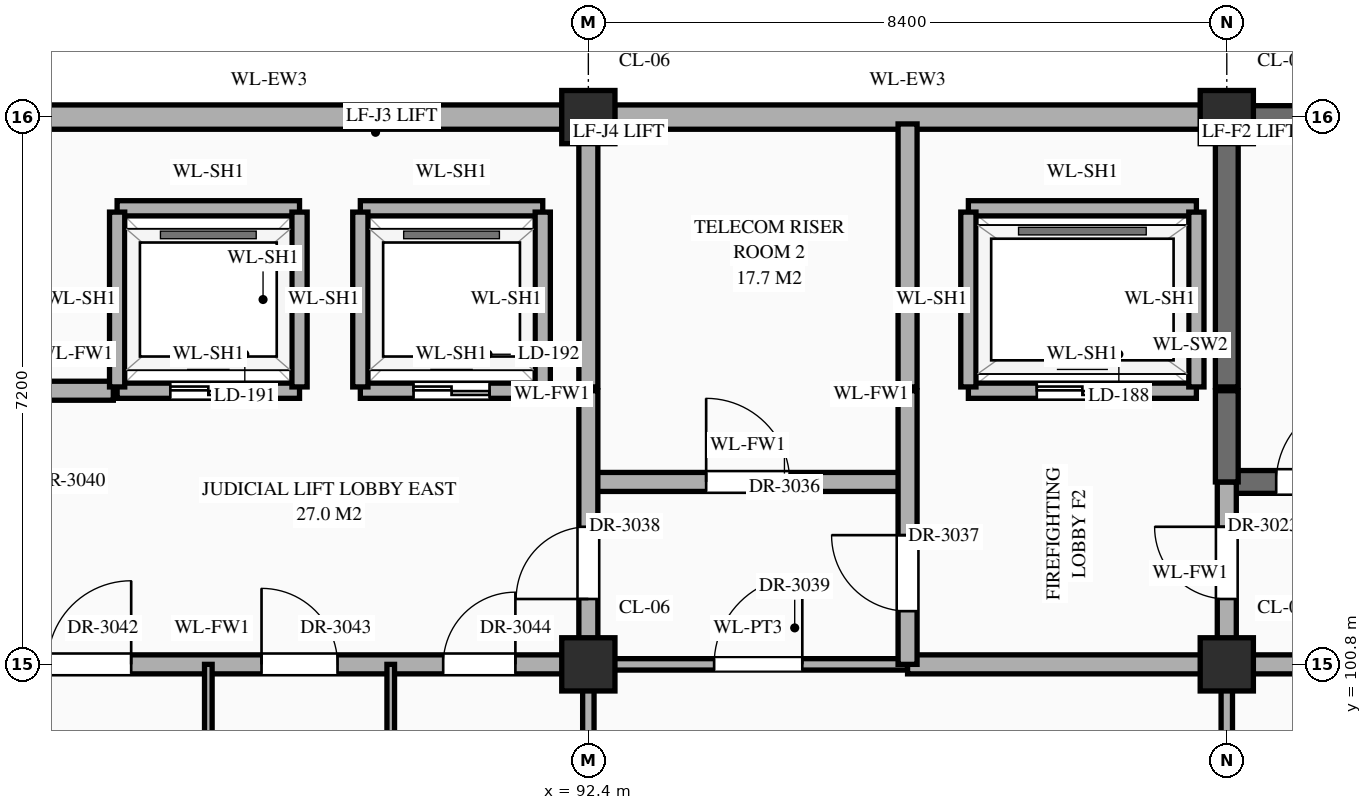
"""IFC4 building model, lengths in metres.
Left out: names, types, materials, properties, quantities, classifications, styles, units other than length and angle.
Written with IfcOpenShell. Run it as: python <this file> out.ifc"""

import sys

from ifc_helpers import new_model, si_unit, direction, frame, frame_2d, origin, origin_2d, place, context, subcontext, project, spatial, rectangle, extrude, element, fill, save


model = new_model("IFC4")
c1 = context("Model", 3, precision=1e-05, world=origin(), true_north=direction((0.0, 1.0)))
c2 = subcontext(c1, "Body", "Model", "MODEL_VIEW")
j1 = project(units=[si_unit("LENGTHUNIT", "METRE"), si_unit("PLANEANGLEUNIT", "RADIAN")], contexts=[c1])
p1 = place(None, origin())
s1 = spatial("IfcSite", under=j1, at=p1, CompositionType="ELEMENT")
p2 = place(p1, origin())
s2 = spatial("IfcBuilding", under=s1, at=p2, CompositionType="ELEMENT")
p3 = place(p2, frame((0.0, 0.0, 51.9)))
s3 = spatial("IfcBuildingStorey", under=s2, at=p3, CompositionType="ELEMENT", Elevation=51.9)
for number, where, z_axis, x_axis in (
    (1, (92.4, 100.8, 0.0), (0.0, 0.0, 1.0), (1.0, 0.0, 0.0)),
    (2, (92.4, 108.0, 0.0), (0.0, 0.0, 1.0), (1.0, 0.0, 0.0)),
    (3, (100.8, 100.8, 0.0), (0.0, 0.0, 1.0), (1.0, 0.0, 0.0)),
    (4, (100.8, 108.0, 0.0), (0.0, 0.0, 1.0), (1.0, 0.0, 0.0)),
):
    element("IfcColumn", number, at=place(p3, frame(where, z_axis=z_axis, x_axis=x_axis)), inside=s3, PredefinedType="COLUMN", context=c2, shape_type="SweptSolid", body=[
        extrude(rectangle(XDim=0.7, YDim=0.7, at=origin_2d()), origin(), (0.0, 0.0, 1.0), 4.2),
    ])
for number, where, z_axis, x_axis in (
    (5, (84.345, 108.0, 0.0), (0.0, 0.0, 1.0), (1.0, 0.0, 0.0)),
    (6, (92.745, 108.0, 0.0), (0.0, 0.0, 1.0), (1.0, 0.0, 0.0)),
):
    element("IfcWall", number, at=place(p3, frame(where, z_axis=z_axis, x_axis=x_axis)), inside=s3, PredefinedType="STANDARD", context=c2, shape_type="SweptSolid", body=[
        extrude(rectangle(XDim=7.71, YDim=0.32, at=frame_2d((3.855, 0.0))), origin(), (0.0, 0.0, 1.0), 3.31),
    ])
p4 = place(p3, frame((101.145, 108.0, 0.0), z_axis=(0.0, 0.0, 1.0), x_axis=(1.0, 0.0, 0.0)))
e7 = element("IfcWall", 7, at=p4, inside=s3, PredefinedType="SHEAR", context=c2, shape_type="SweptSolid", body=[
    extrude(rectangle(XDim=7.71, YDim=0.3, at=frame_2d((3.855, 0.0))), origin(), (0.0, 0.0, 1.0), 3.96),
])
p5 = place(p3, frame((75.6, 100.8, 0.0), z_axis=(0.0, 0.0, 1.0), x_axis=(1.0, 0.0, 0.0)))
e8 = element("IfcWall", 8, at=p5, inside=s3, PredefinedType="STANDARD", context=c2, shape_type="SweptSolid", body=[
    extrude(rectangle(XDim=16.8, YDim=0.25, at=frame_2d((8.4, 0.0))), origin(), (0.0, 0.0, 1.0), 3.11),
])
p6 = place(p5, frame((3.725, 0.0, 0.0)))
e9 = element("IfcOpeningElement", 9, at=p6, cuts=e8, PredefinedType="OPENING", context=c2, shape_type="SweptSolid", body=[
    extrude(rectangle(XDim=0.95, YDim=2.15, at=frame_2d((0.475, 1.075))), frame((0.0, 0.137, 0.0), z_axis=(0.0, -1.0, 0.0), x_axis=(1.0, 0.0, 0.0)), (0.0, 0.0, 1.0), 0.274),
])
p7 = place(p5, frame((9.685, 0.0, 0.0)))
e10 = element("IfcOpeningElement", 10, at=p7, cuts=e8, PredefinedType="OPENING", context=c2, shape_type="SweptSolid", body=[
    extrude(rectangle(XDim=1.1, YDim=2.2, at=frame_2d((0.55, 1.1))), frame((0.0, 0.137, 0.0), z_axis=(0.0, -1.0, 0.0), x_axis=(1.0, 0.0, 0.0)), (0.0, 0.0, 1.0), 0.274),
])
p8 = place(p5, frame((12.5, 0.0, 0.0)))
e11 = element("IfcOpeningElement", 11, at=p8, cuts=e8, PredefinedType="OPENING", context=c2, shape_type="SweptSolid", body=[
    extrude(rectangle(XDim=1.0, YDim=2.2, at=frame_2d((0.5, 1.1))), frame((0.0, 0.137, 0.0), z_axis=(0.0, -1.0, 0.0), x_axis=(1.0, 0.0, 0.0)), (0.0, 0.0, 1.0), 0.274),
])
p9 = place(p5, frame((14.89, 0.0, 0.0)))
e12 = element("IfcOpeningElement", 12, at=p9, cuts=e8, PredefinedType="OPENING", context=c2, shape_type="SweptSolid", body=[
    extrude(rectangle(XDim=0.95, YDim=2.15, at=frame_2d((0.475, 1.075))), frame((0.0, 0.137, 0.0), z_axis=(0.0, -1.0, 0.0), x_axis=(1.0, 0.0, 0.0)), (0.0, 0.0, 1.0), 0.274),
])
p10 = place(p3, frame((92.4, 100.8, 0.0), z_axis=(0.0, 0.0, 1.0), x_axis=(1.0, 0.0, 0.0)))
e13 = element("IfcWall", 13, at=p10, inside=s3, PredefinedType="STANDARD", context=c2, shape_type="SweptSolid", body=[
    extrude(rectangle(XDim=4.2, YDim=0.15, at=frame_2d((2.1, 0.0))), origin(), (0.0, 0.0, 1.0), 3.11),
])
p11 = place(p10, frame((1.655, 0.0, 0.0)))
e14 = element("IfcOpeningElement", 14, at=p11, cuts=e13, PredefinedType="OPENING", context=c2, shape_type="SweptSolid", body=[
    extrude(rectangle(XDim=1.16, YDim=2.3, at=frame_2d((0.58, 1.15))), frame((0.0, 0.087, 0.0), z_axis=(0.0, -1.0, 0.0), x_axis=(1.0, 0.0, 0.0)), (0.0, 0.0, 1.0), 0.174),
])
p12 = place(p3, frame((96.6, 100.8, 0.0), z_axis=(0.0, 0.0, 1.0), x_axis=(1.0, 0.0, 0.0)))
e15 = element("IfcWall", 15, at=p12, inside=s3, PredefinedType="STANDARD", context=c2, shape_type="SweptSolid", body=[
    extrude(rectangle(XDim=12.6, YDim=0.25, at=frame_2d((6.3, 0.0))), origin(), (0.0, 0.0, 1.0), 3.11),
])
p13 = place(p12, frame((7.9, 0.0, 0.0)))
e16 = element("IfcOpeningElement", 16, at=p13, cuts=e15, PredefinedType="OPENING", context=c2, shape_type="SweptSolid", body=[
    extrude(rectangle(XDim=1.0, YDim=2.2, at=frame_2d((0.5, 1.1))), frame((0.0, 0.137, 0.0), z_axis=(0.0, -1.0, 0.0), x_axis=(1.0, 0.0, 0.0)), (0.0, 0.0, 1.0), 0.274),
])
p14 = place(p3, frame((92.4, 103.2, 0.0), z_axis=(0.0, 0.0, 1.0), x_axis=(1.0, 0.0, 0.0)))
e17 = element("IfcWall", 17, at=p14, inside=s3, PredefinedType="STANDARD", context=c2, shape_type="SweptSolid", body=[
    extrude(rectangle(XDim=4.2, YDim=0.25, at=frame_2d((2.1, 0.0))), origin(), (0.0, 0.0, 1.0), 3.96),
])
p15 = place(p14, frame((1.55, 0.0, 0.0)))
e18 = element("IfcOpeningElement", 18, at=p15, cuts=e17, PredefinedType="OPENING", context=c2, shape_type="SweptSolid", body=[
    extrude(rectangle(XDim=1.1, YDim=2.2, at=frame_2d((0.55, 1.1))), frame((0.0, 0.137, 0.0), z_axis=(0.0, -1.0, 0.0), x_axis=(1.0, 0.0, 0.0)), (0.0, 0.0, 1.0), 0.274),
])
p16 = place(p3, frame((100.8, 103.2, 0.0), z_axis=(0.0, 0.0, 1.0), x_axis=(1.0, 0.0, 0.0)))
e19 = element("IfcWall", 19, at=p16, inside=s3, PredefinedType="SHEAR", context=c2, shape_type="SweptSolid", body=[
    extrude(rectangle(XDim=8.4, YDim=0.3, at=frame_2d((4.2, 0.0))), origin(), (0.0, 0.0, 1.0), 3.96),
])
p17 = place(p16, frame((0.65, 0.0, 0.0)))
e20 = element("IfcOpeningElement", 20, at=p17, cuts=e19, PredefinedType="OPENING", context=c2, shape_type="SweptSolid", body=[
    extrude(rectangle(XDim=1.1, YDim=2.2, at=frame_2d((0.55, 1.1))), frame((0.0, 0.162, 0.0), z_axis=(0.0, -1.0, 0.0), x_axis=(1.0, 0.0, 0.0)), (0.0, 0.0, 1.0), 0.324),
])
p18 = place(p3, frame((84.05, 104.4, 0.0), z_axis=(0.0, 0.0, 1.0), x_axis=(1.0, 0.0, 0.0)))
e21 = element("IfcWall", 21, at=p18, inside=s3, PredefinedType="STANDARD", context=c2, shape_type="SweptSolid", body=[
    extrude(rectangle(XDim=2.1, YDim=0.25, at=frame_2d((1.05, 0.0))), origin(), (0.0, 0.0, 1.0), 3.96),
])
p19 = place(p3, frame((86.2, 104.4, 0.0), z_axis=(0.0, 0.0, 1.0), x_axis=(1.0, 0.0, 0.0)))
e22 = element("IfcWall", 22, at=p19, inside=s3, PredefinedType="STANDARD", context=c2, shape_type="SweptSolid", body=[
    extrude(rectangle(XDim=2.4, YDim=0.2, at=frame_2d((1.2, 0.0))), origin(), (0.0, 0.0, 1.0), 3.96),
])
p20 = place(p19, frame((0.7, 0.0, 0.0)))
e23 = element("IfcOpeningElement", 23, at=p20, cuts=e22, PredefinedType="OPENING", context=c2, shape_type="SweptSolid", body=[
    extrude(rectangle(XDim=1.0, YDim=2.15, at=frame_2d((0.5, 1.075))), frame((0.0, 0.112, 0.0), z_axis=(0.0, -1.0, 0.0), x_axis=(1.0, 0.0, 0.0)), (0.0, 0.0, 1.0), 0.224),
])
p21 = place(p3, frame((89.4, 104.4, 0.0), z_axis=(0.0, 0.0, 1.0), x_axis=(1.0, 0.0, 0.0)))
e24 = element("IfcWall", 24, at=p21, inside=s3, PredefinedType="STANDARD", context=c2, shape_type="SweptSolid", body=[
    extrude(rectangle(XDim=2.4, YDim=0.2, at=frame_2d((1.2, 0.0))), origin(), (0.0, 0.0, 1.0), 3.96),
])
p22 = place(p21, frame((0.7, 0.0, 0.0)))
e25 = element("IfcOpeningElement", 25, at=p22, cuts=e24, PredefinedType="OPENING", context=c2, shape_type="SweptSolid", body=[
    extrude(rectangle(XDim=1.0, YDim=2.15, at=frame_2d((0.5, 1.075))), frame((0.0, 0.112, 0.0), z_axis=(0.0, -1.0, 0.0), x_axis=(1.0, 0.0, 0.0)), (0.0, 0.0, 1.0), 0.224),
])
p23 = place(p3, frame((97.4, 104.4, 0.0), z_axis=(0.0, 0.0, 1.0), x_axis=(1.0, 0.0, 0.0)))
e26 = element("IfcWall", 26, at=p23, inside=s3, PredefinedType="STANDARD", context=c2, shape_type="SweptSolid", body=[
    extrude(rectangle(XDim=3.0, YDim=0.2, at=frame_2d((1.5, 0.0))), origin(), (0.0, 0.0, 1.0), 3.96),
])
p24 = place(p23, frame((0.9, 0.0, 0.0)))
e27 = element("IfcOpeningElement", 27, at=p24, cuts=e26, PredefinedType="OPENING", context=c2, shape_type="SweptSolid", body=[
    extrude(rectangle(XDim=1.2, YDim=2.15, at=frame_2d((0.6, 1.075))), frame((0.0, 0.112, 0.0), z_axis=(0.0, -1.0, 0.0), x_axis=(1.0, 0.0, 0.0)), (0.0, 0.0, 1.0), 0.224),
])
for number, where, z_axis, x_axis in (
    (28, (86.2, 106.8, 0.0), (0.0, 0.0, 1.0), (1.0, 0.0, 0.0)),
    (29, (89.4, 106.8, 0.0), (0.0, 0.0, 1.0), (1.0, 0.0, 0.0)),
):
    element("IfcWall", number, at=place(p3, frame(where, z_axis=z_axis, x_axis=x_axis)), inside=s3, PredefinedType="STANDARD", context=c2, shape_type="SweptSolid", body=[
        extrude(rectangle(XDim=2.4, YDim=0.2, at=frame_2d((1.2, 0.0))), origin(), (0.0, 0.0, 1.0), 3.96),
    ])
p25 = place(p3, frame((97.4, 106.8, 0.0), z_axis=(0.0, 0.0, 1.0), x_axis=(1.0, 0.0, 0.0)))
e30 = element("IfcWall", 30, at=p25, inside=s3, PredefinedType="STANDARD", context=c2, shape_type="SweptSolid", body=[
    extrude(rectangle(XDim=3.0, YDim=0.2, at=frame_2d((1.5, 0.0))), origin(), (0.0, 0.0, 1.0), 3.96),
])
p26 = place(p3, frame((86.2, 104.45, 0.0), z_axis=(0.0, 0.0, 1.0), x_axis=(0.0, 1.0, 0.0)))
e31 = element("IfcWall", 31, at=p26, inside=s3, PredefinedType="STANDARD", context=c2, shape_type="SweptSolid", body=[
    extrude(rectangle(XDim=2.3, YDim=0.2, at=frame_2d((1.15, 0.0))), origin(), (0.0, 0.0, 1.0), 3.96),
])
p27 = place(p3, frame((87.4, 96.0, 0.0), z_axis=(0.0, 0.0, 1.0), x_axis=(0.0, 1.0, 0.0)))
e32 = element("IfcWall", 32, at=p27, inside=s3, PredefinedType="STANDARD", context=c2, shape_type="SweptSolid", body=[
    extrude(rectangle(XDim=4.8, YDim=0.1, at=frame_2d((2.4, 0.0))), origin(), (0.0, 0.0, 1.0), 3.96),
])
p28 = place(p27, frame((1.88, 0.0, 0.0)))
e33 = element("IfcOpeningElement", 33, at=p28, cuts=e32, PredefinedType="OPENING", context=c2, shape_type="SweptSolid", body=[
    extrude(rectangle(XDim=1.04, YDim=2.2, at=frame_2d((0.52, 1.1))), frame((0.0, 0.062, 0.0), z_axis=(0.0, -1.0, 0.0), x_axis=(1.0, 0.0, 0.0)), (0.0, 0.0, 1.0), 0.124),
])
for number, where, z_axis, x_axis in (
    (34, (88.6, 104.45, 0.0), (0.0, 0.0, 1.0), (0.0, 1.0, 0.0)),
    (35, (89.4, 104.45, 0.0), (0.0, 0.0, 1.0), (0.0, 1.0, 0.0)),
):
    element("IfcWall", number, at=place(p3, frame(where, z_axis=z_axis, x_axis=x_axis)), inside=s3, PredefinedType="STANDARD", context=c2, shape_type="SweptSolid", body=[
        extrude(rectangle(XDim=2.3, YDim=0.2, at=frame_2d((1.15, 0.0))), origin(), (0.0, 0.0, 1.0), 3.96),
    ])
p29 = place(p3, frame((89.8, 96.0, 0.0), z_axis=(0.0, 0.0, 1.0), x_axis=(0.0, 1.0, 0.0)))
e36 = element("IfcWall", 36, at=p29, inside=s3, PredefinedType="STANDARD", context=c2, shape_type="SweptSolid", body=[
    extrude(rectangle(XDim=4.8, YDim=0.1, at=frame_2d((2.4, 0.0))), origin(), (0.0, 0.0, 1.0), 3.96),
])
p30 = place(p29, frame((1.86, 0.0, 0.0)))
e37 = element("IfcOpeningElement", 37, at=p30, cuts=e36, PredefinedType="OPENING", context=c2, shape_type="SweptSolid", body=[
    extrude(rectangle(XDim=1.08, YDim=2.25, at=frame_2d((0.54, 1.125))), frame((0.0, 0.062, 0.0), z_axis=(0.0, -1.0, 0.0), x_axis=(1.0, 0.0, 0.0)), (0.0, 0.0, 1.0), 0.124),
])
p31 = place(p3, frame((91.8, 104.45, 0.0), z_axis=(0.0, 0.0, 1.0), x_axis=(0.0, 1.0, 0.0)))
e38 = element("IfcWall", 38, at=p31, inside=s3, PredefinedType="STANDARD", context=c2, shape_type="SweptSolid", body=[
    extrude(rectangle(XDim=2.3, YDim=0.2, at=frame_2d((1.15, 0.0))), origin(), (0.0, 0.0, 1.0), 3.96),
])
p32 = place(p3, frame((92.4, 96.0, 0.0), z_axis=(0.0, 0.0, 1.0), x_axis=(0.0, 1.0, 0.0)))
e39 = element("IfcWall", 39, at=p32, inside=s3, PredefinedType="STANDARD", context=c2, shape_type="SweptSolid", body=[
    extrude(rectangle(XDim=4.8, YDim=0.15, at=frame_2d((2.4, 0.0))), origin(), (0.0, 0.0, 1.0), 3.21),
])
p33 = place(p3, frame((92.4, 100.8, 0.0), z_axis=(0.0, 0.0, 1.0), x_axis=(0.0, 1.0, 0.0)))
e40 = element("IfcWall", 40, at=p33, inside=s3, PredefinedType="STANDARD", context=c2, shape_type="SweptSolid", body=[
    extrude(rectangle(XDim=3.6, YDim=0.25, at=frame_2d((1.8, 0.0))), origin(), (0.0, 0.0, 1.0), 3.21),
])
p34 = place(p33, frame((0.86, 0.0, 0.0)))
e41 = element("IfcOpeningElement", 41, at=p34, cuts=e40, PredefinedType="OPENING", context=c2, shape_type="SweptSolid", body=[
    extrude(rectangle(XDim=0.95, YDim=2.15, at=frame_2d((0.475, 1.075))), frame((0.0, 0.137, 0.0), z_axis=(0.0, -1.0, 0.0), x_axis=(1.0, 0.0, 0.0)), (0.0, 0.0, 1.0), 0.274),
])
p35 = place(p3, frame((92.4, 104.45, 0.0), z_axis=(0.0, 0.0, 1.0), x_axis=(0.0, 1.0, 0.0)))
e42 = element("IfcWall", 42, at=p35, inside=s3, PredefinedType="STANDARD", context=c2, shape_type="SweptSolid", body=[
    extrude(rectangle(XDim=3.46, YDim=0.25, at=frame_2d((1.73, 0.0))), origin(), (0.0, 0.0, 1.0), 3.21),
])
p36 = place(p3, frame((96.6, 100.8, 0.0), z_axis=(0.0, 0.0, 1.0), x_axis=(0.0, 1.0, 0.0)))
e43 = element("IfcWall", 43, at=p36, inside=s3, PredefinedType="STANDARD", context=c2, shape_type="SweptSolid", body=[
    extrude(rectangle(XDim=3.6, YDim=0.25, at=frame_2d((1.8, 0.0))), origin(), (0.0, 0.0, 1.0), 3.96),
])
p37 = place(p36, frame((0.7, 0.0, 0.0)))
e44 = element("IfcOpeningElement", 44, at=p37, cuts=e43, PredefinedType="OPENING", context=c2, shape_type="SweptSolid", body=[
    extrude(rectangle(XDim=1.0, YDim=2.2, at=frame_2d((0.5, 1.1))), frame((0.0, 0.137, 0.0), z_axis=(0.0, -1.0, 0.0), x_axis=(1.0, 0.0, 0.0)), (0.0, 0.0, 1.0), 0.274),
])
p38 = place(p3, frame((96.6, 104.45, 0.0), z_axis=(0.0, 0.0, 1.0), x_axis=(0.0, 1.0, 0.0)))
e45 = element("IfcWall", 45, at=p38, inside=s3, PredefinedType="STANDARD", context=c2, shape_type="SweptSolid", body=[
    extrude(rectangle(XDim=3.46, YDim=0.25, at=frame_2d((1.73, 0.0))), origin(), (0.0, 0.0, 1.0), 3.96),
])
for number, where, z_axis, x_axis in (
    (46, (97.4, 104.45, 0.0), (0.0, 0.0, 1.0), (0.0, 1.0, 0.0)),
    (47, (100.4, 104.45, 0.0), (0.0, 0.0, 1.0), (0.0, 1.0, 0.0)),
):
    element("IfcWall", number, at=place(p3, frame(where, z_axis=z_axis, x_axis=x_axis)), inside=s3, PredefinedType="STANDARD", context=c2, shape_type="SweptSolid", body=[
        extrude(rectangle(XDim=2.3, YDim=0.2, at=frame_2d((1.15, 0.0))), origin(), (0.0, 0.0, 1.0), 3.96),
    ])
p39 = place(p3, frame((100.8, 96.0, 0.0), z_axis=(0.0, 0.0, 1.0), x_axis=(0.0, 1.0, 0.0)))
e48 = element("IfcWall", 48, at=p39, inside=s3, PredefinedType="STANDARD", context=c2, shape_type="SweptSolid", body=[
    extrude(rectangle(XDim=4.8, YDim=0.15, at=frame_2d((2.4, 0.0))), origin(), (0.0, 0.0, 1.0), 3.21),
])
p40 = place(p3, frame((100.8, 100.8, 0.0), z_axis=(0.0, 0.0, 1.0), x_axis=(0.0, 1.0, 0.0)))
e49 = element("IfcWall", 49, at=p40, inside=s3, PredefinedType="STANDARD", context=c2, shape_type="SweptSolid", body=[
    extrude(rectangle(XDim=2.4, YDim=0.25, at=frame_2d((1.2, 0.0))), origin(), (0.0, 0.0, 1.0), 3.21),
])
p41 = place(p40, frame((0.86, 0.0, 0.0)))
e50 = element("IfcOpeningElement", 50, at=p41, cuts=e49, PredefinedType="OPENING", context=c2, shape_type="SweptSolid", body=[
    extrude(rectangle(XDim=0.95, YDim=2.15, at=frame_2d((0.475, 1.075))), frame((0.0, 0.137, 0.0), z_axis=(0.0, -1.0, 0.0), x_axis=(1.0, 0.0, 0.0)), (0.0, 0.0, 1.0), 0.274),
])
p42 = place(p3, frame((100.8, 103.2, 0.0), z_axis=(0.0, 0.0, 1.0), x_axis=(0.0, 1.0, 0.0)))
e51 = element("IfcWall", 51, at=p42, inside=s3, PredefinedType="SHEAR", context=c2, shape_type="SweptSolid", body=[
    extrude(rectangle(XDim=1.2, YDim=0.3, at=frame_2d((0.6, 0.0))), origin(), (0.0, 0.0, 1.0), 3.96),
])
p43 = place(p3, frame((100.8, 104.45, 0.0), z_axis=(0.0, 0.0, 1.0), x_axis=(0.0, 1.0, 0.0)))
e52 = element("IfcWall", 52, at=p43, inside=s3, PredefinedType="SHEAR", context=c2, shape_type="SweptSolid", body=[
    extrude(rectangle(XDim=3.46, YDim=0.3, at=frame_2d((1.73, 0.0))), origin(), (0.0, 0.0, 1.0), 3.96),
])
p44 = place(p24, origin())
e53 = element("IfcDoor", 53, at=p44, inside=s3, OperationType="DOUBLE_DOOR_SLIDING", PredefinedType="DOOR", context=c2, shape_type="SweptSolid", body=[
    extrude(rectangle(XDim=1.2, YDim=2.15, at=frame_2d((0.6, 1.075))), frame((0.0, 0.025, 0.0), z_axis=(0.0, -1.0, 0.0), x_axis=(1.0, 0.0, 0.0)), (0.0, 0.0, 1.0), 0.05),
])
fill(e27, e53)
p45 = place(p20, origin())
e54 = element("IfcDoor", 54, at=p45, inside=s3, OperationType="DOUBLE_DOOR_SLIDING", PredefinedType="DOOR", context=c2, shape_type="SweptSolid", body=[
    extrude(rectangle(XDim=1.0, YDim=2.15, at=frame_2d((0.5, 1.075))), frame((0.0, 0.025, 0.0), z_axis=(0.0, -1.0, 0.0), x_axis=(1.0, 0.0, 0.0)), (0.0, 0.0, 1.0), 0.05),
])
fill(e23, e54)
p46 = place(p22, origin())
e55 = element("IfcDoor", 55, at=p46, inside=s3, OperationType="DOUBLE_DOOR_SLIDING", PredefinedType="DOOR", context=c2, shape_type="SweptSolid", body=[
    extrude(rectangle(XDim=1.0, YDim=2.15, at=frame_2d((0.5, 1.075))), frame((0.0, 0.025, 0.0), z_axis=(0.0, -1.0, 0.0), x_axis=(1.0, 0.0, 0.0)), (0.0, 0.0, 1.0), 0.05),
])
fill(e25, e55)
p47 = place(p17, origin())
e56 = element("IfcDoor", 56, at=p47, inside=s3, OperationType="SINGLE_SWING_RIGHT", PredefinedType="DOOR", context=c2, shape_type="SweptSolid", body=[
    extrude(rectangle(XDim=1.1, YDim=2.2, at=frame_2d((0.55, 1.1))), frame((0.0, 0.025, 0.0), z_axis=(0.0, -1.0, 0.0), x_axis=(1.0, 0.0, 0.0)), (0.0, 0.0, 1.0), 0.05),
])
fill(e20, e56)
p48 = place(p41, origin())
e57 = element("IfcDoor", 57, at=p48, inside=s3, OperationType="SINGLE_SWING_RIGHT", PredefinedType="DOOR", context=c2, shape_type="SweptSolid", body=[
    extrude(rectangle(XDim=0.95, YDim=2.15, at=frame_2d((0.475, 1.075))), frame((0.0, 0.025, 0.0), z_axis=(0.0, -1.0, 0.0), x_axis=(1.0, 0.0, 0.0)), (0.0, 0.0, 1.0), 0.05),
])
fill(e50, e57)
p49 = place(p15, origin())
e58 = element("IfcDoor", 58, at=p49, inside=s3, OperationType="SINGLE_SWING_LEFT", PredefinedType="DOOR", context=c2, shape_type="SweptSolid", body=[
    extrude(rectangle(XDim=1.1, YDim=2.2, at=frame_2d((0.55, 1.1))), frame((0.0, 0.025, 0.0), z_axis=(0.0, -1.0, 0.0), x_axis=(1.0, 0.0, 0.0)), (0.0, 0.0, 1.0), 0.05),
])
fill(e18, e58)
p50 = place(p37, origin())
e59 = element("IfcDoor", 59, at=p50, inside=s3, OperationType="SINGLE_SWING_RIGHT", PredefinedType="DOOR", context=c2, shape_type="SweptSolid", body=[
    extrude(rectangle(XDim=1.0, YDim=2.2, at=frame_2d((0.5, 1.1))), frame((0.0, 0.025, 0.0), z_axis=(0.0, -1.0, 0.0), x_axis=(1.0, 0.0, 0.0)), (0.0, 0.0, 1.0), 0.05),
])
fill(e44, e59)
p51 = place(p34, origin())
e60 = element("IfcDoor", 60, at=p51, inside=s3, OperationType="SINGLE_SWING_LEFT", PredefinedType="DOOR", context=c2, shape_type="SweptSolid", body=[
    extrude(rectangle(XDim=0.95, YDim=2.15, at=frame_2d((0.475, 1.075))), frame((0.0, 0.025, 0.0), z_axis=(0.0, -1.0, 0.0), x_axis=(1.0, 0.0, 0.0)), (0.0, 0.0, 1.0), 0.05),
])
fill(e41, e60)
p52 = place(p11, origin())
e61 = element("IfcDoor", 61, at=p52, inside=s3, OperationType="SINGLE_SWING_RIGHT", PredefinedType="DOOR", context=c2, shape_type="SweptSolid", body=[
    extrude(rectangle(XDim=1.16, YDim=2.3, at=frame_2d((0.58, 1.15))), frame((0.0, 0.025, 0.0), z_axis=(0.0, -1.0, 0.0), x_axis=(1.0, 0.0, 0.0)), (0.0, 0.0, 1.0), 0.05),
])
fill(e14, e61)
p53 = place(p7, origin())
e62 = element("IfcDoor", 62, at=p53, inside=s3, OperationType="SINGLE_SWING_RIGHT", PredefinedType="DOOR", context=c2, shape_type="SweptSolid", body=[
    extrude(rectangle(XDim=1.1, YDim=2.2, at=frame_2d((0.55, 1.1))), frame((0.0, 0.025, 0.0), z_axis=(0.0, -1.0, 0.0), x_axis=(1.0, 0.0, 0.0)), (0.0, 0.0, 1.0), 0.05),
])
fill(e10, e62)
p54 = place(p8, origin())
e63 = element("IfcDoor", 63, at=p54, inside=s3, OperationType="SINGLE_SWING_LEFT", PredefinedType="DOOR", context=c2, shape_type="SweptSolid", body=[
    extrude(rectangle(XDim=1.0, YDim=2.2, at=frame_2d((0.5, 1.1))), frame((0.0, 0.025, 0.0), z_axis=(0.0, -1.0, 0.0), x_axis=(1.0, 0.0, 0.0)), (0.0, 0.0, 1.0), 0.05),
])
fill(e11, e63)
p55 = place(p9, origin())
e64 = element("IfcDoor", 64, at=p55, inside=s3, OperationType="SINGLE_SWING_RIGHT", PredefinedType="DOOR", context=c2, shape_type="SweptSolid", body=[
    extrude(rectangle(XDim=0.95, YDim=2.15, at=frame_2d((0.475, 1.075))), frame((0.0, 0.025, 0.0), z_axis=(0.0, -1.0, 0.0), x_axis=(1.0, 0.0, 0.0)), (0.0, 0.0, 1.0), 0.05),
])
fill(e12, e64)
save(model, sys.argv[1])
